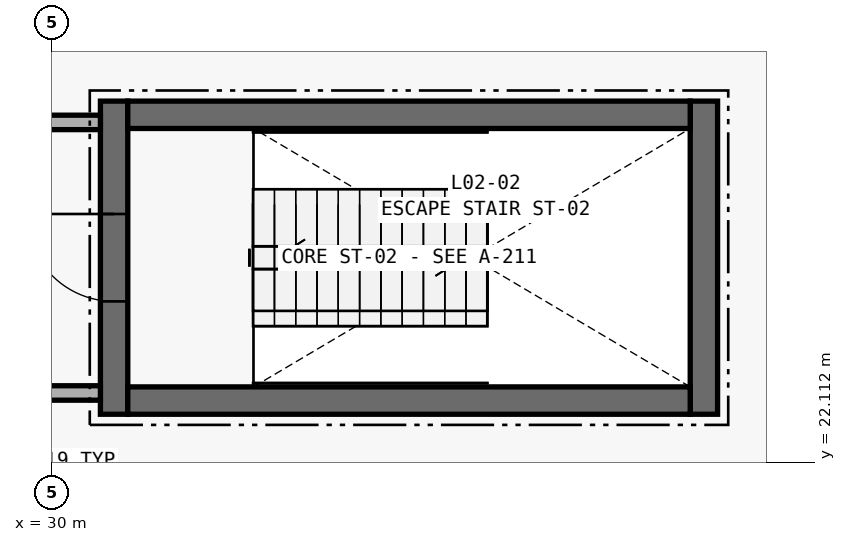
"""IFC4 building model, lengths in metres.
Left out: names, types, materials, properties, quantities, classifications, styles, units other than length and angle.
Written with IfcOpenShell. Run it as: python <this file> out.ifc"""

import sys

from ifc_helpers import new_model, si_unit, direction, frame, frame_2d, origin, place, context, subcontext, project, spatial, rectangle, extrude, element, fill, save


model = new_model("IFC4")
c1 = context("Model", 3, precision=1e-05, world=origin(), true_north=direction((0.0, 1.0)))
c2 = subcontext(c1, "Body", "Model", "MODEL_VIEW")
j1 = project(units=[si_unit("LENGTHUNIT", "METRE"), si_unit("PLANEANGLEUNIT", "RADIAN")], contexts=[c1])
p1 = place(None, origin())
s1 = spatial("IfcSite", under=j1, at=p1, CompositionType="ELEMENT")
p2 = place(p1, origin())
s2 = spatial("IfcBuilding", under=s1, at=p2, CompositionType="ELEMENT")
p3 = place(p2, frame((0.0, 0.0, 9.0)))
s3 = spatial("IfcBuildingStorey", under=s2, at=p3, CompositionType="ELEMENT", Elevation=9.0)
p4 = place(p3, frame((30.82, 22.74, 0.0), z_axis=(0.0, 0.0, 1.0), x_axis=(0.0, 1.0, 0.0)))
e1 = element("IfcWall", 1, at=p4, inside=s3, PredefinedType="SHEAR", context=c2, shape_type="SweptSolid", body=[
    extrude(rectangle(XDim=4.12, YDim=0.36, at=frame_2d((2.06, 0.0))), origin(), (0.0, 0.0, 1.0), 7.82),
])
p5 = place(p4, frame((1.485, 0.0, 0.0)))
e2 = element("IfcOpeningElement", 2, at=p5, cuts=e1, PredefinedType="OPENING", context=c2, shape_type="SweptSolid", body=[
    extrude(rectangle(XDim=1.15, YDim=2.15, at=frame_2d((0.575, 1.075))), frame((0.0, 0.195, 0.0), z_axis=(0.0, -1.0, 0.0), x_axis=(1.0, 0.0, 0.0)), (0.0, 0.0, 1.0), 0.39),
])
p6 = place(p3, frame((38.58, 22.74, 0.0), z_axis=(0.0, 0.0, 1.0), x_axis=(0.0, 1.0, 0.0)))
e3 = element("IfcWall", 3, at=p6, inside=s3, PredefinedType="SHEAR", context=c2, shape_type="SweptSolid", body=[
    extrude(rectangle(XDim=4.12, YDim=0.36, at=frame_2d((2.06, 0.0))), origin(), (0.0, 0.0, 1.0), 7.82),
])
for number, where, z_axis, x_axis in (
    (4, (31.0, 26.68, 0.0), (0.0, 0.0, 1.0), (1.0, 0.0, 0.0)),
    (5, (31.0, 22.92, 0.0), (0.0, 0.0, 1.0), (1.0, 0.0, 0.0)),
):
    element("IfcWall", number, at=place(p3, frame(where, z_axis=z_axis, x_axis=x_axis)), inside=s3, PredefinedType="SHEAR", context=c2, shape_type="SweptSolid", body=[
        extrude(rectangle(XDim=7.4, YDim=0.36, at=frame_2d((3.7, 0.0))), origin(), (0.0, 0.0, 1.0), 7.82),
    ])
p7 = place(p3, frame((29.485, 23.02, 0.0), z_axis=(0.0, 0.0, 1.0), x_axis=(1.0, 0.0, 0.0)))
e6 = element("IfcWall", 6, at=p7, inside=s3, PredefinedType="PARTITIONING", context=c2, shape_type="SweptSolid", body=[
    extrude(rectangle(XDim=1.155, YDim=0.19, at=frame_2d((0.577, 0.0))), origin(), (0.0, 0.0, 1.0), 6.7),
])
p8 = place(p3, frame((26.625, 26.58, 0.0), z_axis=(0.0, 0.0, 1.0), x_axis=(1.0, 0.0, 0.0)))
e7 = element("IfcWall", 7, at=p8, inside=s3, PredefinedType="PARTITIONING", context=c2, shape_type="SweptSolid", body=[
    extrude(rectangle(XDim=4.015, YDim=0.19, at=frame_2d((2.007, 0.0))), origin(), (0.0, 0.0, 1.0), 6.7),
])
p9 = place(p5, origin())
e8 = element("IfcDoor", 8, at=p9, inside=s3, OperationType="SINGLE_SWING_RIGHT", PredefinedType="DOOR", context=c2, shape_type="SweptSolid", body=[
    extrude(rectangle(XDim=1.15, YDim=2.15, at=frame_2d((0.575, 1.075))), frame((0.0, 0.025, 0.0), z_axis=(0.0, -1.0, 0.0), x_axis=(1.0, 0.0, 0.0)), (0.0, 0.0, 1.0), 0.05),
])
fill(e2, e8)
save(model, sys.argv[1])
